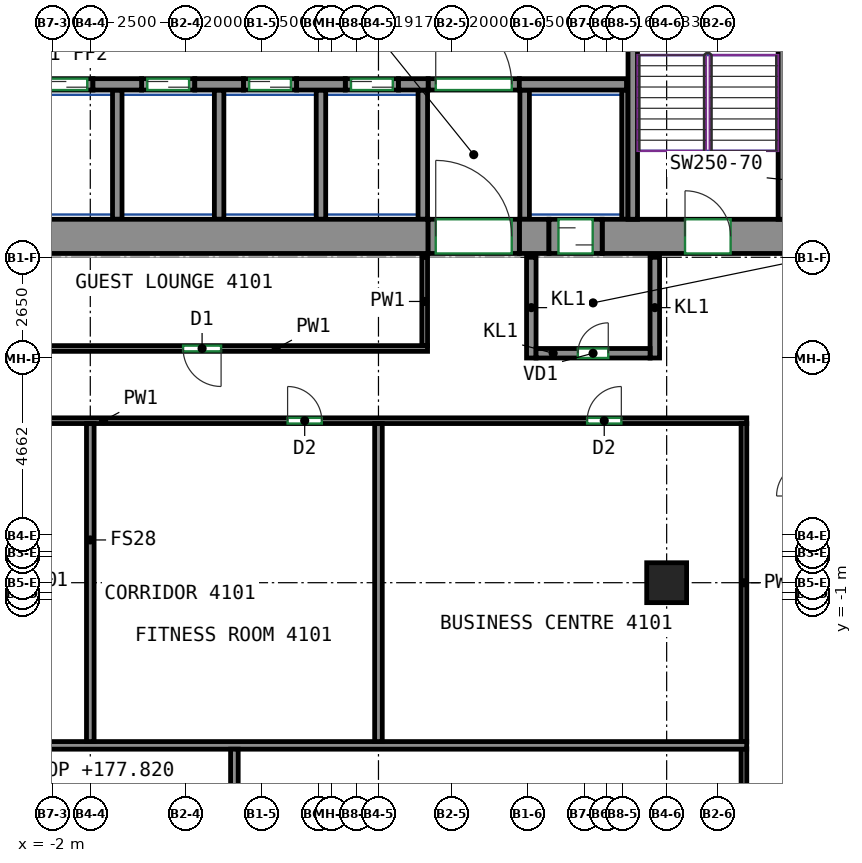
"""IFC4 building model, lengths in metres.
Left out: names, types, materials, properties, quantities, classifications, styles, units other than length and angle.
Written with IfcOpenShell. Run it as: python <this file> out.ifc"""

import sys

from ifc_helpers import new_model, si_unit, direction, frame, frame_2d, origin, origin_2d, place, context, subcontext, project, spatial, rectangle, extrude, source, transform, mapped, element, fill, save


model = new_model("IFC4")
c1 = context("Model", 3, precision=1e-05, world=origin(), true_north=direction((0.0, 1.0)))
c2 = subcontext(c1, "Body", "Model", "MODEL_VIEW")
j1 = project(units=[si_unit("LENGTHUNIT", "METRE"), si_unit("PLANEANGLEUNIT", "RADIAN")], contexts=[c1])
p1 = place(None, origin())
s1 = spatial("IfcSite", under=j1, at=p1, CompositionType="ELEMENT")
p2 = place(p1, origin())
s2 = spatial("IfcBuilding", under=s1, at=p2, CompositionType="ELEMENT")
p3 = place(p2, frame((0.0, 0.0, 175.3)))
s3 = spatial("IfcBuildingStorey", under=s2, at=p3, CompositionType="ELEMENT", Elevation=175.3)
m1 = source(origin(), c2, "Body", "SweptSolid", [
    extrude(rectangle(XDim=1.05, YDim=1.05, at=origin_2d()), origin(), (0.0, 0.0, 1.0), 3.12),
])
p4 = place(p3, frame((14.167, -0.562, 0.0), z_axis=(0.0, 0.0, 1.0), x_axis=(1.0, 0.0, 0.0)))
e1 = element("IfcColumn", 1, at=p4, inside=s3, PredefinedType="COLUMN", context=c2, shape_type="MappedRepresentation", body=[
    mapped(m1, transform((0.0, 0.0, 0.0))),
])
m2 = source(origin(), c2, "Body", "SweptSolid", [
    extrude(rectangle(XDim=14.18, YDim=0.9, at=frame_2d((7.09, 0.0))), origin(), (0.0, 0.0, 1.0), 3.12),
])
p5 = place(p3, frame((-6.29, 8.55, 0.0), z_axis=(0.0, 0.0, 1.0), x_axis=(1.0, 0.0, 0.0)))
e2 = element("IfcWall", 2, at=p5, inside=s3, PredefinedType="SHEAR", context=c2, shape_type="MappedRepresentation", body=[
    mapped(m2, transform((0.0, 0.0, 0.0))),
])
m3 = source(origin(), c2, "Body", "SweptSolid", [
    extrude(rectangle(XDim=0.78, YDim=0.9, at=frame_2d((0.39, 0.0))), origin(), (0.0, 0.0, 1.0), 3.12),
])
p6 = place(p3, frame((10.29, 8.55, 0.0), z_axis=(0.0, 0.0, 1.0), x_axis=(1.0, 0.0, 0.0)))
e3 = element("IfcWall", 3, at=p6, inside=s3, PredefinedType="SHEAR", context=c2, shape_type="MappedRepresentation", body=[
    mapped(m3, transform((0.0, 0.0, 0.0))),
])
m4 = source(origin(), c2, "Body", "SweptSolid", [
    extrude(rectangle(XDim=5.53, YDim=0.9, at=frame_2d((2.765, 0.0))), origin(), (0.0, 0.0, 1.0), 3.12),
])
p7 = place(p3, frame((12.47, 8.55, 0.0), z_axis=(0.0, 0.0, 1.0), x_axis=(1.0, 0.0, 0.0)))
e4 = element("IfcWall", 4, at=p7, inside=s3, PredefinedType="SHEAR", context=c2, shape_type="MappedRepresentation", body=[
    mapped(m4, transform((0.0, 0.0, 0.0))),
])
p8 = place(p7, frame((2.18, 0.0, 0.0)))
e5 = element("IfcOpeningElement", 5, at=p8, cuts=e4, PredefinedType="OPENING", context=c2, shape_type="SweptSolid", body=[
    extrude(rectangle(XDim=1.2, YDim=2.1, at=frame_2d((0.6, 1.05))), frame((0.0, 0.46, 0.0), z_axis=(0.0, -1.0, 0.0), x_axis=(1.0, 0.0, 0.0)), (0.0, 0.0, 1.0), 0.92),
])
m5 = source(origin(), c2, "Body", "SweptSolid", [
    extrude(rectangle(XDim=12.0, YDim=0.9, at=frame_2d((6.0, 0.0))), origin(), (0.0, 0.0, 1.0), 3.12),
])
p9 = place(p3, frame((17.55, 9.0, 0.0), z_axis=(0.0, 0.0, 1.0), x_axis=(0.0, 1.0, 0.0)))
e6 = element("IfcWall", 6, at=p9, inside=s3, PredefinedType="SHEAR", context=c2, shape_type="MappedRepresentation", body=[
    mapped(m5, transform((0.0, 0.0, 0.0))),
])
m6 = source(origin(), c2, "Body", "SweptSolid", [
    extrude(rectangle(XDim=7.75, YDim=0.25, at=frame_2d((3.875, 0.0))), origin(), (0.0, 0.0, 1.0), 3.12),
])
p10 = place(p3, frame((13.275, 9.0, 0.0), z_axis=(0.0, 0.0, 1.0), x_axis=(0.0, 1.0, 0.0)))
e7 = element("IfcWall", 7, at=p10, inside=s3, PredefinedType="SHEAR", context=c2, shape_type="MappedRepresentation", body=[
    mapped(m6, transform((0.0, 0.0, 0.0))),
])
m7 = source(origin(), c2, "Body", "SweptSolid", [
    extrude(rectangle(XDim=1.28, YDim=0.3, at=frame_2d((0.64, 0.0))), origin(), (0.0, 0.0, 1.0), 3.12),
])
for number, where, z_axis, x_axis in (
    (8, (-0.93, 12.55, 0.0), (0.0, 0.0, 1.0), (1.0, 0.0, 0.0)),
    (9, (1.75, 12.55, 0.0), (0.0, 0.0, 1.0), (1.0, 0.0, 0.0)),
    (10, (4.43, 12.55, 0.0), (0.0, 0.0, 1.0), (1.0, 0.0, 0.0)),
):
    element("IfcWall", number, at=place(p3, frame(where, z_axis=z_axis, x_axis=x_axis)), inside=s3, PredefinedType="SHEAR", context=c2, shape_type="MappedRepresentation", body=[
        mapped(m7, transform((0.0, 0.0, 0.0))),
    ])
m8 = source(origin(), c2, "Body", "SweptSolid", [
    extrude(rectangle(XDim=0.78, YDim=0.3, at=frame_2d((0.39, 0.0))), origin(), (0.0, 0.0, 1.0), 3.12),
])
p11 = place(p3, frame((7.11, 12.55, 0.0), z_axis=(0.0, 0.0, 1.0), x_axis=(1.0, 0.0, 0.0)))
e11 = element("IfcWall", 11, at=p11, inside=s3, PredefinedType="SHEAR", context=c2, shape_type="MappedRepresentation", body=[
    mapped(m8, transform((0.0, 0.0, 0.0))),
])
m9 = source(origin(), c2, "Body", "SweptSolid", [
    extrude(rectangle(XDim=2.82, YDim=0.3, at=frame_2d((1.41, 0.0))), origin(), (0.0, 0.0, 1.0), 3.12),
])
p12 = place(p3, frame((10.29, 12.55, 0.0), z_axis=(0.0, 0.0, 1.0), x_axis=(1.0, 0.0, 0.0)))
e12 = element("IfcWall", 12, at=p12, inside=s3, PredefinedType="SHEAR", context=c2, shape_type="MappedRepresentation", body=[
    mapped(m9, transform((0.0, 0.0, 0.0))),
])
m10 = source(origin(), c2, "Body", "SweptSolid", [
    extrude(rectangle(XDim=1.4, YDim=0.3, at=frame_2d((0.7, 0.0))), origin(), (0.0, 0.0, 1.0), 3.12),
])
p13 = place(p3, frame((-2.33, 12.55, 0.0), z_axis=(0.0, 0.0, 1.0), x_axis=(1.0, 0.0, 0.0)))
e13 = element("IfcWall", 13, at=p13, inside=s3, PredefinedType="PARTITIONING", context=c2, shape_type="MappedRepresentation", body=[
    mapped(m10, transform((0.0, 0.0, 0.0))),
])
p14 = place(p13, frame((0.15, 0.0, 0.0)))
e14 = element("IfcOpeningElement", 14, at=p14, cuts=e13, PredefinedType="OPENING", context=c2, shape_type="SweptSolid", body=[
    extrude(rectangle(XDim=1.1, YDim=2.1, at=frame_2d((0.55, 1.05))), frame((0.0, 0.16, 0.0), z_axis=(0.0, -1.0, 0.0), x_axis=(1.0, 0.0, 0.0)), (0.0, 0.0, 1.0), 0.32),
])
m11 = source(origin(), c2, "Body", "SweptSolid", [
    extrude(rectangle(XDim=1.4, YDim=0.3, at=frame_2d((0.7, 0.0))), origin(), (0.0, 0.0, 1.0), 3.12),
])
p15 = place(p3, frame((0.35, 12.55, 0.0), z_axis=(0.0, 0.0, 1.0), x_axis=(1.0, 0.0, 0.0)))
e15 = element("IfcWall", 15, at=p15, inside=s3, PredefinedType="PARTITIONING", context=c2, shape_type="MappedRepresentation", body=[
    mapped(m11, transform((0.0, 0.0, 0.0))),
])
p16 = place(p15, frame((0.15, 0.0, 0.0)))
e16 = element("IfcOpeningElement", 16, at=p16, cuts=e15, PredefinedType="OPENING", context=c2, shape_type="SweptSolid", body=[
    extrude(rectangle(XDim=1.1, YDim=2.1, at=frame_2d((0.55, 1.05))), frame((0.0, 0.16, 0.0), z_axis=(0.0, -1.0, 0.0), x_axis=(1.0, 0.0, 0.0)), (0.0, 0.0, 1.0), 0.32),
])
p17 = place(p3, frame((3.03, 12.55, 0.0), z_axis=(0.0, 0.0, 1.0), x_axis=(1.0, 0.0, 0.0)))
e17 = element("IfcWall", 17, at=p17, inside=s3, PredefinedType="PARTITIONING", context=c2, shape_type="MappedRepresentation", body=[
    mapped(m11, transform((0.0, 0.0, 0.0))),
])
p18 = place(p17, frame((0.15, 0.0, 0.0)))
e18 = element("IfcOpeningElement", 18, at=p18, cuts=e17, PredefinedType="OPENING", context=c2, shape_type="SweptSolid", body=[
    extrude(rectangle(XDim=1.1, YDim=2.1, at=frame_2d((0.55, 1.05))), frame((0.0, 0.16, 0.0), z_axis=(0.0, -1.0, 0.0), x_axis=(1.0, 0.0, 0.0)), (0.0, 0.0, 1.0), 0.32),
])
p19 = place(p3, frame((5.71, 12.55, 0.0), z_axis=(0.0, 0.0, 1.0), x_axis=(1.0, 0.0, 0.0)))
e19 = element("IfcWall", 19, at=p19, inside=s3, PredefinedType="PARTITIONING", context=c2, shape_type="MappedRepresentation", body=[
    mapped(m10, transform((0.0, 0.0, 0.0))),
])
p20 = place(p19, frame((0.15, 0.0, 0.0)))
e20 = element("IfcOpeningElement", 20, at=p20, cuts=e19, PredefinedType="OPENING", context=c2, shape_type="SweptSolid", body=[
    extrude(rectangle(XDim=1.1, YDim=2.1, at=frame_2d((0.55, 1.05))), frame((0.0, 0.16, 0.0), z_axis=(0.0, -1.0, 0.0), x_axis=(1.0, 0.0, 0.0)), (0.0, 0.0, 1.0), 0.32),
])
m12 = source(origin(), c2, "Body", "SweptSolid", [
    extrude(rectangle(XDim=2.4, YDim=0.3, at=frame_2d((1.2, 0.0))), origin(), (0.0, 0.0, 1.0), 3.12),
])
p21 = place(p3, frame((7.89, 12.55, 0.0), z_axis=(0.0, 0.0, 1.0), x_axis=(1.0, 0.0, 0.0)))
e21 = element("IfcWall", 21, at=p21, inside=s3, PredefinedType="PARTITIONING", context=c2, shape_type="MappedRepresentation", body=[
    mapped(m12, transform((0.0, 0.0, 0.0))),
])
p22 = place(p21, frame((0.2, 0.0, 0.0)))
e22 = element("IfcOpeningElement", 22, at=p22, cuts=e21, PredefinedType="OPENING", context=c2, shape_type="SweptSolid", body=[
    extrude(rectangle(XDim=2.0, YDim=2.1, at=frame_2d((1.0, 1.05))), frame((0.0, 0.16, 0.0), z_axis=(0.0, -1.0, 0.0), x_axis=(1.0, 0.0, 0.0)), (0.0, 0.0, 1.0), 0.32),
])
m13 = source(origin(), c2, "Body", "SweptSolid", [
    extrude(rectangle(XDim=2.65, YDim=0.25, at=frame_2d((1.325, 0.0))), origin(), (0.0, 0.0, 1.0), 3.12),
])
for number, where, z_axis, x_axis in (
    (23, (10.605, 5.35, 0.0), (0.0, 0.0, 1.0), (0.0, 1.0, 0.0)),
    (24, (13.855, 5.35, 0.0), (0.0, 0.0, 1.0), (0.0, 1.0, 0.0)),
):
    element("IfcWall", number, at=place(p3, frame(where, z_axis=z_axis, x_axis=x_axis)), inside=s3, PredefinedType="PARTITIONING", context=c2, shape_type="MappedRepresentation", body=[
        mapped(m13, transform((0.0, 0.0, 0.0))),
    ])
m14 = source(origin(), c2, "Body", "SweptSolid", [
    extrude(rectangle(XDim=3.0, YDim=0.25, at=frame_2d((1.5, 0.0))), origin(), (0.0, 0.0, 1.0), 3.12),
])
p23 = place(p3, frame((10.73, 5.475, 0.0), z_axis=(0.0, 0.0, 1.0), x_axis=(1.0, 0.0, 0.0)))
e25 = element("IfcWall", 25, at=p23, inside=s3, PredefinedType="PARTITIONING", context=c2, shape_type="MappedRepresentation", body=[
    mapped(m14, transform((0.0, 0.0, 0.0))),
])
p24 = place(p23, frame((1.1, 0.0, 0.0)))
e26 = element("IfcOpeningElement", 26, at=p24, cuts=e25, PredefinedType="OPENING", context=c2, shape_type="SweptSolid", body=[
    extrude(rectangle(XDim=0.8, YDim=2.0, at=frame_2d((0.4, 1.0))), frame((0.0, 0.135, 0.0), z_axis=(0.0, -1.0, 0.0), x_axis=(1.0, 0.0, 0.0)), (0.0, 0.0, 1.0), 0.27),
])
m15 = source(origin(), c2, "Body", "SweptSolid", [
    extrude(rectangle(XDim=3.4, YDim=0.25, at=frame_2d((1.7, 0.0))), origin(), (0.0, 0.0, 1.0), 3.12),
])
p25 = place(p3, frame((10.43, 9.0, 0.0), z_axis=(0.0, 0.0, 1.0), x_axis=(0.0, 1.0, 0.0)))
e27 = element("IfcWall", 27, at=p25, inside=s3, PredefinedType="PARTITIONING", context=c2, shape_type="MappedRepresentation", body=[
    mapped(m15, transform((0.0, 0.0, 0.0))),
])
m16 = source(origin(), c2, "Body", "SweptSolid", [
    extrude(rectangle(XDim=3.4, YDim=0.165, at=frame_2d((1.7, 0.0))), origin(), (0.0, 0.0, 1.0), 3.12),
])
p26 = place(p3, frame((13.067, 9.0, 0.0), z_axis=(0.0, 0.0, 1.0), x_axis=(0.0, 1.0, 0.0)))
e28 = element("IfcWall", 28, at=p26, inside=s3, PredefinedType="PARTITIONING", context=c2, shape_type="MappedRepresentation", body=[
    mapped(m16, transform((0.0, 0.0, 0.0))),
])
for number, where, z_axis, x_axis in (
    (29, (2.39, 9.0, 0.0), (0.0, 0.0, 1.0), (0.0, 1.0, 0.0)),
    (30, (5.07, 9.0, 0.0), (0.0, 0.0, 1.0), (0.0, 1.0, 0.0)),
    (31, (7.75, 9.0, 0.0), (0.0, 0.0, 1.0), (0.0, 1.0, 0.0)),
    (32, (-0.29, 9.0, 0.0), (0.0, 0.0, 1.0), (0.0, 1.0, 0.0)),
):
    element("IfcWall", number, at=place(p3, frame(where, z_axis=z_axis, x_axis=x_axis)), inside=s3, PredefinedType="PARTITIONING", context=c2, shape_type="MappedRepresentation", body=[
        mapped(m15, transform((0.0, 0.0, 0.0))),
    ])
m17 = source(origin(), c2, "Body", "SweptSolid", [
    extrude(rectangle(XDim=2.4, YDim=0.9, at=frame_2d((1.2, 0.0))), origin(), (0.0, 0.0, 1.0), 2.7),
])
p27 = place(p3, frame((7.89, 8.55, 0.0), z_axis=(0.0, 0.0, 1.0), x_axis=(1.0, 0.0, 0.0)))
e33 = element("IfcWall", 33, at=p27, inside=s3, PredefinedType="PARTITIONING", context=c2, shape_type="MappedRepresentation", body=[
    mapped(m17, transform((0.0, 0.0, 0.0))),
])
p28 = place(p27, frame((0.2, 0.0, 0.0)))
e34 = element("IfcOpeningElement", 34, at=p28, cuts=e33, PredefinedType="OPENING", context=c2, shape_type="SweptSolid", body=[
    extrude(rectangle(XDim=2.0, YDim=2.1, at=frame_2d((1.0, 1.05))), frame((0.0, 0.46, 0.0), z_axis=(0.0, -1.0, 0.0), x_axis=(1.0, 0.0, 0.0)), (0.0, 0.0, 1.0), 0.92),
])
m18 = source(origin(), c2, "Body", "SweptSolid", [
    extrude(rectangle(XDim=1.4, YDim=0.9, at=frame_2d((0.7, 0.0))), origin(), (0.0, 0.0, 1.0), 2.7),
])
p29 = place(p3, frame((11.07, 8.55, 0.0), z_axis=(0.0, 0.0, 1.0), x_axis=(1.0, 0.0, 0.0)))
e35 = element("IfcWall", 35, at=p29, inside=s3, PredefinedType="PARTITIONING", context=c2, shape_type="MappedRepresentation", body=[
    mapped(m18, transform((0.0, 0.0, 0.0))),
])
p30 = place(p29, frame((0.25, 0.0, 0.0)))
e36 = element("IfcOpeningElement", 36, at=p30, cuts=e35, PredefinedType="OPENING", context=c2, shape_type="SweptSolid", body=[
    extrude(rectangle(XDim=0.9, YDim=2.1, at=frame_2d((0.45, 1.05))), frame((0.0, 0.46, 0.0), z_axis=(0.0, -1.0, 0.0), x_axis=(1.0, 0.0, 0.0)), (0.0, 0.0, 1.0), 0.92),
])
p31 = place(p3, frame((7.875, 5.6, 0.0), z_axis=(0.0, 0.0, 1.0), x_axis=(-1.0, 0.0, 0.0)))
e37 = element("IfcWall", 37, at=p31, inside=s3, PredefinedType="PARTITIONING", context=c2, shape_type="SweptSolid", body=[
    extrude(rectangle(XDim=13.275, YDim=0.15, at=frame_2d((6.637, 0.0))), origin(), (0.0, 0.0, 1.0), 3.12),
])
p32 = place(p31, frame((5.433, 0.0, 0.0)))
e38 = element("IfcOpeningElement", 38, at=p32, cuts=e37, PredefinedType="OPENING", context=c2, shape_type="SweptSolid", body=[
    extrude(rectangle(XDim=1.0, YDim=2.1, at=frame_2d((0.5, 1.05))), frame((0.0, 0.085, 0.0), z_axis=(0.0, -1.0, 0.0), x_axis=(1.0, 0.0, 0.0)), (0.0, 0.0, 1.0), 0.17),
])
p33 = place(p3, frame((7.8, 8.0, 0.0), z_axis=(0.0, 0.0, 1.0), x_axis=(0.0, -1.0, 0.0)))
e39 = element("IfcWall", 39, at=p33, inside=s3, PredefinedType="PARTITIONING", context=c2, shape_type="SweptSolid", body=[
    extrude(rectangle(XDim=2.325, YDim=0.15, at=frame_2d((1.163, 0.0))), origin(), (0.0, 0.0, 1.0), 3.12),
])
p34 = place(p3, frame((-17.575, 3.7, 0.0), z_axis=(0.0, 0.0, 1.0), x_axis=(1.0, 0.0, 0.0)))
e40 = element("IfcWall", 40, at=p34, inside=s3, PredefinedType="PARTITIONING", context=c2, shape_type="SweptSolid", body=[
    extrude(rectangle(XDim=33.85, YDim=0.15, at=frame_2d((16.925, 0.0))), origin(), (0.0, 0.0, 1.0), 3.12),
])
p35 = place(p34, frame((6.596, 0.0, 0.0)))
e41 = element("IfcOpeningElement", 41, at=p35, cuts=e40, PredefinedType="OPENING", context=c2, shape_type="SweptSolid", body=[
    extrude(rectangle(XDim=0.9, YDim=2.1, at=frame_2d((0.45, 1.05))), frame((0.0, 0.085, 0.0), z_axis=(0.0, -1.0, 0.0), x_axis=(1.0, 0.0, 0.0)), (0.0, 0.0, 1.0), 0.17),
])
p36 = place(p34, frame((10.082, 0.0, 0.0)))
e42 = element("IfcOpeningElement", 42, at=p36, cuts=e40, PredefinedType="OPENING", context=c2, shape_type="SweptSolid", body=[
    extrude(rectangle(XDim=0.9, YDim=2.1, at=frame_2d((0.45, 1.05))), frame((0.0, 0.085, 0.0), z_axis=(0.0, -1.0, 0.0), x_axis=(1.0, 0.0, 0.0)), (0.0, 0.0, 1.0), 0.17),
])
p37 = place(p34, frame((21.767, 0.0, 0.0)))
e43 = element("IfcOpeningElement", 43, at=p37, cuts=e40, PredefinedType="OPENING", context=c2, shape_type="SweptSolid", body=[
    extrude(rectangle(XDim=0.9, YDim=2.1, at=frame_2d((0.45, 1.05))), frame((0.0, 0.085, 0.0), z_axis=(0.0, -1.0, 0.0), x_axis=(1.0, 0.0, 0.0)), (0.0, 0.0, 1.0), 0.17),
])
p38 = place(p34, frame((29.649, 0.0, 0.0)))
e44 = element("IfcOpeningElement", 44, at=p38, cuts=e40, PredefinedType="OPENING", context=c2, shape_type="SweptSolid", body=[
    extrude(rectangle(XDim=0.9, YDim=2.1, at=frame_2d((0.45, 1.05))), frame((0.0, 0.085, 0.0), z_axis=(0.0, -1.0, 0.0), x_axis=(1.0, 0.0, 0.0)), (0.0, 0.0, 1.0), 0.17),
])
p39 = place(p3, frame((16.2, -4.753, 0.0), z_axis=(0.0, 0.0, 1.0), x_axis=(0.0, 1.0, 0.0)))
e45 = element("IfcWall", 45, at=p39, inside=s3, PredefinedType="PARTITIONING", context=c2, shape_type="SweptSolid", body=[
    extrude(rectangle(XDim=8.378, YDim=0.15, at=frame_2d((4.189, 0.0))), origin(), (0.0, 0.0, 1.0), 3.12),
])
p40 = place(p3, frame((16.2, -15.425, 0.0), z_axis=(0.0, 0.0, 1.0), x_axis=(0.0, 1.0, 0.0)))
e46 = element("IfcWall", 46, at=p40, inside=s3, PredefinedType="PARTITIONING", context=c2, shape_type="SweptSolid", body=[
    extrude(rectangle(XDim=10.492, YDim=0.15, at=frame_2d((5.246, 0.0))), origin(), (0.0, 0.0, 1.0), 3.12),
])
p41 = place(p3, frame((-13.873, -4.843, 0.0), z_axis=(0.0, 0.0, 1.0), x_axis=(1.0, 0.0, 0.0)))
e47 = element("IfcWall", 47, at=p41, inside=s3, PredefinedType="PARTITIONING", context=c2, shape_type="SweptSolid", body=[
    extrude(rectangle(XDim=30.146, YDim=0.2, at=frame_2d((15.073, 0.0))), origin(), (0.0, 0.0, 1.0), 3.12),
])
for number, where, z_axis, x_axis in (
    (48, (-1.0, -4.743, 0.0), (0.0, 0.0, 1.0), (0.0, 1.0, 0.0)),
    (49, (6.583, -4.743, 0.0), (0.0, 0.0, 1.0), (0.0, 1.0, 0.0)),
):
    element("IfcWall", number, at=place(p3, frame(where, z_axis=z_axis, x_axis=x_axis)), inside=s3, PredefinedType="PARTITIONING", context=c2, shape_type="SweptSolid", body=[
        extrude(rectangle(XDim=8.366, YDim=0.2, at=frame_2d((4.183, 0.0))), origin(), (0.0, 0.0, 1.0), 3.12),
    ])
p42 = place(p3, frame((2.792, -15.423, 0.0), z_axis=(0.0, 0.0, 1.0), x_axis=(0.0, 1.0, 0.0)))
e50 = element("IfcWall", 50, at=p42, inside=s3, PredefinedType="PARTITIONING", context=c2, shape_type="SweptSolid", body=[
    extrude(rectangle(XDim=10.48, YDim=0.2, at=frame_2d((5.24, 0.0))), origin(), (0.0, 0.0, 1.0), 3.12),
])
p43 = place(p22, origin())
e51 = element("IfcDoor", 51, at=p43, inside=s3, OperationType="DOUBLE_DOOR_SINGLE_SWING", PredefinedType="DOOR", context=c2, shape_type="SweptSolid", body=[
    extrude(rectangle(XDim=2.0, YDim=2.1, at=frame_2d((1.0, 1.05))), frame((0.0, 0.025, 0.0), z_axis=(0.0, -1.0, 0.0), x_axis=(1.0, 0.0, 0.0)), (0.0, 0.0, 1.0), 0.05),
])
fill(e22, e51)
p44 = place(p28, origin())
e52 = element("IfcDoor", 52, at=p44, inside=s3, OperationType="DOUBLE_DOOR_SINGLE_SWING", PredefinedType="DOOR", context=c2, shape_type="SweptSolid", body=[
    extrude(rectangle(XDim=2.0, YDim=2.1, at=frame_2d((1.0, 1.05))), frame((0.0, 0.355, 0.0), z_axis=(0.0, -1.0, 0.0), x_axis=(1.0, 0.0, 0.0)), (0.0, 0.0, 1.0), 0.05),
])
fill(e34, e52)
p45 = place(p24, origin())
e53 = element("IfcDoor", 53, at=p45, inside=s3, OperationType="SINGLE_SWING_RIGHT", PredefinedType="DOOR", context=c2, shape_type="SweptSolid", body=[
    extrude(rectangle(XDim=0.8, YDim=2.0, at=frame_2d((0.4, 1.0))), frame((0.0, 0.025, 0.0), z_axis=(0.0, -1.0, 0.0), x_axis=(1.0, 0.0, 0.0)), (0.0, 0.0, 1.0), 0.05),
])
fill(e26, e53)
p46 = place(p30, origin())
e54 = element("IfcDoor", 54, at=p46, inside=s3, OperationType="SLIDING_TO_LEFT", PredefinedType="DOOR", context=c2, shape_type="SweptSolid", body=[
    extrude(rectangle(XDim=0.9, YDim=2.1, at=frame_2d((0.45, 1.05))), frame((0.0, 0.355, 0.0), z_axis=(0.0, -1.0, 0.0), x_axis=(1.0, 0.0, 0.0)), (0.0, 0.0, 1.0), 0.05),
])
fill(e36, e54)
p47 = place(p14, origin())
e55 = element("IfcDoor", 55, at=p47, inside=s3, OperationType="DOUBLE_DOOR_SLIDING", PredefinedType="DOOR", context=c2, shape_type="SweptSolid", body=[
    extrude(rectangle(XDim=1.1, YDim=2.1, at=frame_2d((0.55, 1.05))), frame((0.0, 0.025, 0.0), z_axis=(0.0, -1.0, 0.0), x_axis=(1.0, 0.0, 0.0)), (0.0, 0.0, 1.0), 0.05),
])
fill(e14, e55)
p48 = place(p16, origin())
e56 = element("IfcDoor", 56, at=p48, inside=s3, OperationType="DOUBLE_DOOR_SLIDING", PredefinedType="DOOR", context=c2, shape_type="SweptSolid", body=[
    extrude(rectangle(XDim=1.1, YDim=2.1, at=frame_2d((0.55, 1.05))), frame((0.0, 0.025, 0.0), z_axis=(0.0, -1.0, 0.0), x_axis=(1.0, 0.0, 0.0)), (0.0, 0.0, 1.0), 0.05),
])
fill(e16, e56)
p49 = place(p18, origin())
e57 = element("IfcDoor", 57, at=p49, inside=s3, OperationType="DOUBLE_DOOR_SLIDING", PredefinedType="DOOR", context=c2, shape_type="SweptSolid", body=[
    extrude(rectangle(XDim=1.1, YDim=2.1, at=frame_2d((0.55, 1.05))), frame((0.0, 0.025, 0.0), z_axis=(0.0, -1.0, 0.0), x_axis=(1.0, 0.0, 0.0)), (0.0, 0.0, 1.0), 0.05),
])
fill(e18, e57)
p50 = place(p20, origin())
e58 = element("IfcDoor", 58, at=p50, inside=s3, OperationType="DOUBLE_DOOR_SLIDING", PredefinedType="DOOR", context=c2, shape_type="SweptSolid", body=[
    extrude(rectangle(XDim=1.1, YDim=2.1, at=frame_2d((0.55, 1.05))), frame((0.0, 0.025, 0.0), z_axis=(0.0, -1.0, 0.0), x_axis=(1.0, 0.0, 0.0)), (0.0, 0.0, 1.0), 0.05),
])
fill(e20, e58)
p51 = place(p8, origin())
e59 = element("IfcDoor", 59, at=p51, inside=s3, OperationType="DOUBLE_DOOR_SINGLE_SWING", PredefinedType="DOOR", context=c2, shape_type="SweptSolid", body=[
    extrude(rectangle(XDim=1.2, YDim=2.1, at=frame_2d((0.6, 1.05))), frame((0.0, 0.355, 0.0), z_axis=(0.0, -1.0, 0.0), x_axis=(1.0, 0.0, 0.0)), (0.0, 0.0, 1.0), 0.05),
])
fill(e5, e59)
p52 = place(p37, origin())
e60 = element("IfcDoor", 60, at=p52, inside=s3, OperationType="SINGLE_SWING_LEFT", PredefinedType="DOOR", context=c2, shape_type="SweptSolid", body=[
    extrude(rectangle(XDim=0.9, YDim=2.1, at=frame_2d((0.45, 1.05))), frame((0.0, 0.025, 0.0), z_axis=(0.0, -1.0, 0.0), x_axis=(1.0, 0.0, 0.0)), (0.0, 0.0, 1.0), 0.05),
])
fill(e43, e60)
p53 = place(p38, origin())
e61 = element("IfcDoor", 61, at=p53, inside=s3, OperationType="SINGLE_SWING_RIGHT", PredefinedType="DOOR", context=c2, shape_type="SweptSolid", body=[
    extrude(rectangle(XDim=0.9, YDim=2.1, at=frame_2d((0.45, 1.05))), frame((0.0, 0.025, 0.0), z_axis=(0.0, -1.0, 0.0), x_axis=(1.0, 0.0, 0.0)), (0.0, 0.0, 1.0), 0.05),
])
fill(e44, e61)
p54 = place(p32, origin())
e62 = element("IfcDoor", 62, at=p54, inside=s3, OperationType="SINGLE_SWING_LEFT", PredefinedType="DOOR", context=c2, shape_type="SweptSolid", body=[
    extrude(rectangle(XDim=1.0, YDim=2.1, at=frame_2d((0.5, 1.05))), frame((0.0, 0.025, 0.0), z_axis=(0.0, -1.0, 0.0), x_axis=(1.0, 0.0, 0.0)), (0.0, 0.0, 1.0), 0.05),
])
fill(e38, e62)
save(model, sys.argv[1])
